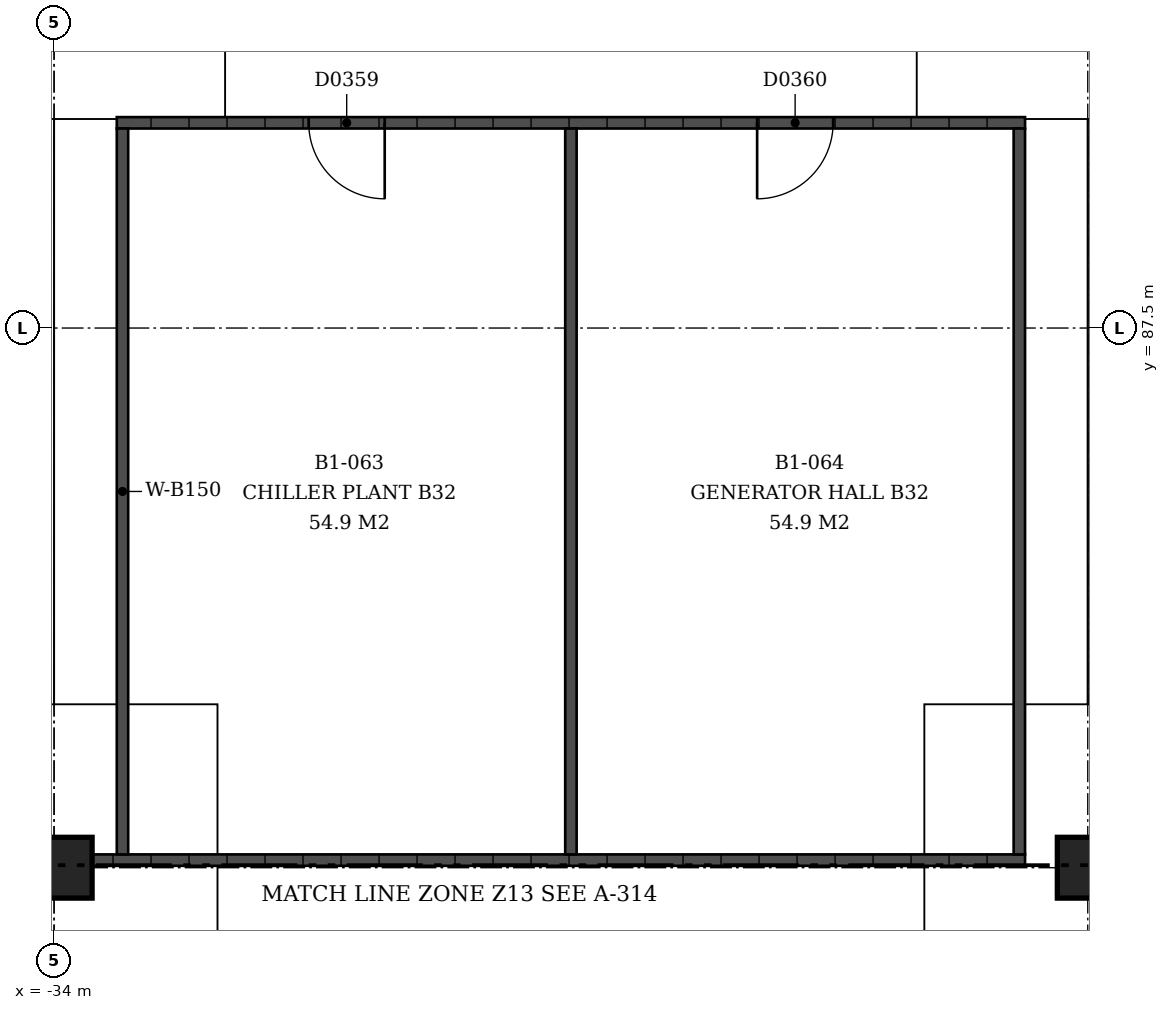
"""IFC4 building model, lengths in metres.
Left out: names, types, materials, properties, quantities, classifications, styles, units other than length and angle.
Written with IfcOpenShell. Run it as: python <this file> out.ifc"""

import sys

from ifc_helpers import new_model, si_unit, direction, frame, frame_2d, origin, origin_2d, place, context, subcontext, project, spatial, rectangle, extrude, element, fill, save


model = new_model("IFC4")
c1 = context("Model", 3, precision=1e-05, world=origin(), true_north=direction((0.0, 1.0)))
c2 = subcontext(c1, "Body", "Model", "MODEL_VIEW")
j1 = project(units=[si_unit("LENGTHUNIT", "METRE"), si_unit("PLANEANGLEUNIT", "RADIAN")], contexts=[c1])
p1 = place(None, origin())
s1 = spatial("IfcSite", under=j1, at=p1, CompositionType="ELEMENT")
p2 = place(p1, origin())
s2 = spatial("IfcBuilding", under=s1, at=p2, CompositionType="ELEMENT")
p3 = place(p2, frame((0.0, 0.0, -4.5)))
s3 = spatial("IfcBuildingStorey", under=s2, at=p3, CompositionType="ELEMENT", Elevation=-4.5)
p4 = place(p3, frame((-34.0, 80.4, 0.0), z_axis=(0.0, 0.0, 1.0), x_axis=(-1.0, 0.0, 0.0)))
e1 = element("IfcColumn", 1, at=p4, inside=s3, PredefinedType="COLUMN", context=c2, shape_type="SweptSolid", body=[
    extrude(rectangle(XDim=1.0, YDim=0.8, at=origin_2d()), origin(), (0.0, 0.0, 1.0), 4.5),
])
p5 = place(p3, frame((-20.4, 80.4, 0.0), z_axis=(0.0, 0.0, 1.0), x_axis=(-1.0, 0.0, 0.0)))
e2 = element("IfcColumn", 2, at=p5, inside=s3, PredefinedType="COLUMN", context=c2, shape_type="SweptSolid", body=[
    extrude(rectangle(XDim=0.8, YDim=0.8, at=origin_2d()), origin(), (0.0, 0.0, 1.0), 4.5),
])
p6 = place(p3, frame((-33.5, 80.5, 0.0), z_axis=(0.0, 0.0, 1.0), x_axis=(1.0, 0.0, 0.0)))
e3 = element("IfcWall", 3, at=p6, inside=s3, PredefinedType="SOLIDWALL", context=c2, shape_type="SweptSolid", body=[
    extrude(rectangle(XDim=12.275, YDim=0.15, at=frame_2d((6.137, 0.0))), origin(), (0.0, 0.0, 1.0), 3.0),
])
p7 = place(p3, frame((-33.175, 90.2, 0.0), z_axis=(0.0, 0.0, 1.0), x_axis=(1.0, 0.0, 0.0)))
e4 = element("IfcWall", 4, at=p7, inside=s3, PredefinedType="SOLIDWALL", context=c2, shape_type="SweptSolid", body=[
    extrude(rectangle(XDim=11.95, YDim=0.15, at=frame_2d((5.975, 0.0))), origin(), (0.0, 0.0, 1.0), 3.0),
])
p8 = place(p7, frame((2.525, 0.0, 0.0)))
e5 = element("IfcOpeningElement", 5, at=p8, cuts=e4, PredefinedType="OPENING", context=c2, shape_type="SweptSolid", body=[
    extrude(rectangle(XDim=1.0, YDim=2.1, at=frame_2d((0.5, 1.05))), frame((0.0, 0.075, 0.0), z_axis=(0.0, -1.0, 0.0), x_axis=(1.0, 0.0, 0.0)), (0.0, 0.0, 1.0), 0.15),
])
p9 = place(p7, frame((8.425, 0.0, 0.0)))
e6 = element("IfcOpeningElement", 6, at=p9, cuts=e4, PredefinedType="OPENING", context=c2, shape_type="SweptSolid", body=[
    extrude(rectangle(XDim=1.0, YDim=2.1, at=frame_2d((0.5, 1.05))), frame((0.0, 0.075, 0.0), z_axis=(0.0, -1.0, 0.0), x_axis=(1.0, 0.0, 0.0)), (0.0, 0.0, 1.0), 0.15),
])
for number, where, z_axis, x_axis in (
    (7, (-33.1, 80.575, 0.0), (0.0, 0.0, 1.0), (0.0, 1.0, 0.0)),
    (8, (-27.2, 80.575, 0.0), (0.0, 0.0, 1.0), (0.0, 1.0, 0.0)),
    (9, (-21.3, 80.575, 0.0), (0.0, 0.0, 1.0), (0.0, 1.0, 0.0)),
):
    element("IfcWall", number, at=place(p3, frame(where, z_axis=z_axis, x_axis=x_axis)), inside=s3, PredefinedType="SOLIDWALL", context=c2, shape_type="SweptSolid", body=[
        extrude(rectangle(XDim=9.55, YDim=0.15, at=frame_2d((4.775, 0.0))), origin(), (0.0, 0.0, 1.0), 3.0),
    ])
p10 = place(p8, origin())
e10 = element("IfcDoor", 10, at=p10, inside=s3, OperationType="SINGLE_SWING_RIGHT", PredefinedType="DOOR", context=c2, shape_type="SweptSolid", body=[
    extrude(rectangle(XDim=1.0, YDim=2.1, at=frame_2d((0.5, 1.05))), frame((0.0, 0.025, 0.0), z_axis=(0.0, -1.0, 0.0), x_axis=(1.0, 0.0, 0.0)), (0.0, 0.0, 1.0), 0.05),
])
fill(e5, e10)
p11 = place(p9, origin())
e11 = element("IfcDoor", 11, at=p11, inside=s3, OperationType="SINGLE_SWING_LEFT", PredefinedType="DOOR", context=c2, shape_type="SweptSolid", body=[
    extrude(rectangle(XDim=1.0, YDim=2.1, at=frame_2d((0.5, 1.05))), frame((0.0, 0.025, 0.0), z_axis=(0.0, -1.0, 0.0), x_axis=(1.0, 0.0, 0.0)), (0.0, 0.0, 1.0), 0.05),
])
fill(e6, e11)
save(model, sys.argv[1])
